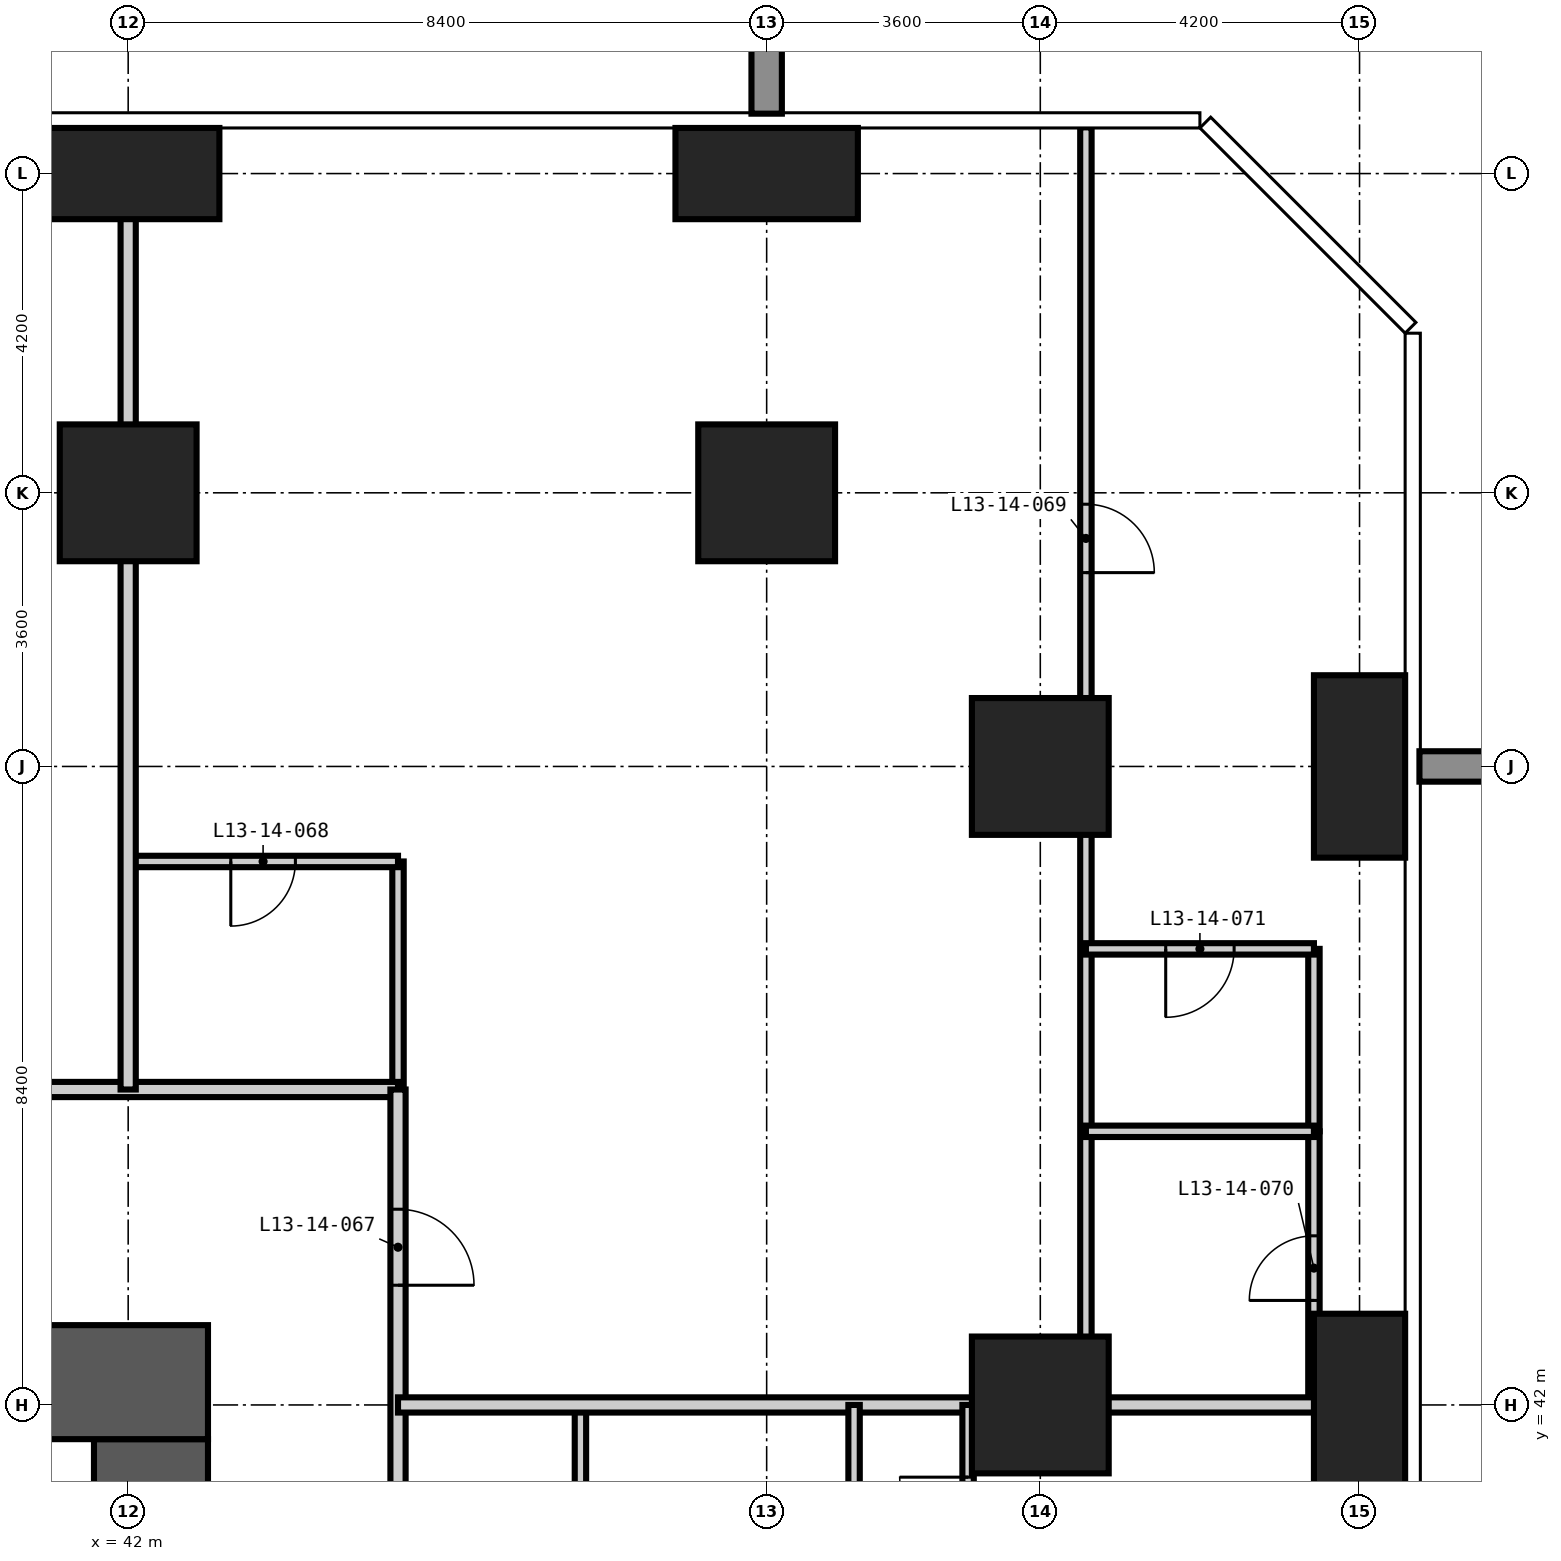
"""IFC4 building model, lengths in metres.
Left out: names, types, materials, properties, quantities, classifications, styles, units other than length and angle.
Written with IfcOpenShell. Run it as: python <this file> out.ifc"""

import sys

from ifc_helpers import new_model, si_unit, direction, frame, frame_2d, origin, origin_2d, place, context, subcontext, project, spatial, rectangle, extrude, element, fill, save


model = new_model("IFC4")
c1 = context("Model", 3, precision=1e-05, world=origin(), true_north=direction((0.0, 1.0)))
c2 = subcontext(c1, "Body", "Model", "MODEL_VIEW")
j1 = project(units=[si_unit("LENGTHUNIT", "METRE"), si_unit("PLANEANGLEUNIT", "RADIAN")], contexts=[c1])
p1 = place(None, origin())
s1 = spatial("IfcSite", under=j1, at=p1, CompositionType="ELEMENT")
p2 = place(p1, origin())
s2 = spatial("IfcBuilding", under=s1, at=p2, CompositionType="ELEMENT")
p3 = place(p2, frame((0.0, 0.0, 55.8)))
s3 = spatial("IfcBuildingStorey", under=s2, at=p3, CompositionType="ELEMENT", Elevation=55.8)
p4 = place(p3, frame((42.0, 54.0, -0.35), z_axis=(0.0, 0.0, 1.0), x_axis=(1.0, 0.0, 0.0)))
e1 = element("IfcColumn", 1, at=p4, inside=s3, PredefinedType="COLUMN", context=c2, shape_type="SweptSolid", body=[
    extrude(rectangle(XDim=1.8, YDim=1.8, at=origin_2d()), origin(), (0.0, 0.0, 1.0), 3.6),
])
p5 = place(p3, frame((42.0, 58.2, -0.35), z_axis=(0.0, 0.0, 1.0), x_axis=(1.0, 0.0, 0.0)))
e2 = element("IfcColumn", 2, at=p5, inside=s3, PredefinedType="COLUMN", context=c2, shape_type="SweptSolid", body=[
    extrude(rectangle(XDim=2.4, YDim=1.2, at=origin_2d()), origin(), (0.0, 0.0, 1.0), 3.6),
])
p6 = place(p3, frame((50.4, 54.0, -0.35), z_axis=(0.0, 0.0, 1.0), x_axis=(1.0, 0.0, 0.0)))
e3 = element("IfcColumn", 3, at=p6, inside=s3, PredefinedType="COLUMN", context=c2, shape_type="SweptSolid", body=[
    extrude(rectangle(XDim=1.8, YDim=1.8, at=origin_2d()), origin(), (0.0, 0.0, 1.0), 3.6),
])
p7 = place(p3, frame((50.4, 58.2, -0.35), z_axis=(0.0, 0.0, 1.0), x_axis=(1.0, 0.0, 0.0)))
e4 = element("IfcColumn", 4, at=p7, inside=s3, PredefinedType="COLUMN", context=c2, shape_type="SweptSolid", body=[
    extrude(rectangle(XDim=2.4, YDim=1.2, at=origin_2d()), origin(), (0.0, 0.0, 1.0), 3.6),
])
for number, where, z_axis, x_axis in (
    (5, (54.0, 42.0, -0.35), (0.0, 0.0, 1.0), (1.0, 0.0, 0.0)),
    (6, (54.0, 50.4, -0.35), (0.0, 0.0, 1.0), (1.0, 0.0, 0.0)),
):
    element("IfcColumn", number, at=place(p3, frame(where, z_axis=z_axis, x_axis=x_axis)), inside=s3, PredefinedType="COLUMN", context=c2, shape_type="SweptSolid", body=[
        extrude(rectangle(XDim=1.8, YDim=1.8, at=origin_2d()), origin(), (0.0, 0.0, 1.0), 3.6),
    ])
for number, where, z_axis, x_axis in (
    (7, (58.2, 42.0, -0.35), (0.0, 0.0, 1.0), (1.0, 0.0, 0.0)),
    (8, (58.2, 50.4, -0.35), (0.0, 0.0, 1.0), (1.0, 0.0, 0.0)),
):
    element("IfcColumn", number, at=place(p3, frame(where, z_axis=z_axis, x_axis=x_axis)), inside=s3, PredefinedType="COLUMN", context=c2, shape_type="SweptSolid", body=[
        extrude(rectangle(XDim=1.2, YDim=2.4, at=origin_2d()), origin(), (0.0, 0.0, 1.0), 3.6),
    ])
p8 = place(p3, frame((42.3, 17.25, -0.35), z_axis=(0.0, 0.0, 1.0), x_axis=(0.0, 1.0, 0.0)))
e9 = element("IfcWall", 9, at=p8, inside=s3, PredefinedType="SHEAR", context=c2, shape_type="SweptSolid", body=[
    extrude(rectangle(XDim=24.3, YDim=1.5, at=frame_2d((12.15, 0.0))), origin(), (0.0, 0.0, 1.0), 3.6),
])
p9 = place(p8, frame((0.35, 0.0, 0.35)))
e10 = element("IfcOpeningElement", 10, at=p9, cuts=e9, PredefinedType="OPENING", context=c2, shape_type="SweptSolid", body=[
    extrude(rectangle(XDim=1.2, YDim=2.2, at=frame_2d((0.6, 1.1))), frame((0.0, 0.76, 0.0), z_axis=(0.0, -1.0, 0.0), x_axis=(1.0, 0.0, 0.0)), (0.0, 0.0, 1.0), 1.52),
])
p10 = place(p8, frame((11.65, 0.0, 0.35)))
e11 = element("IfcOpeningElement", 11, at=p10, cuts=e9, PredefinedType="OPENING", context=c2, shape_type="SweptSolid", body=[
    extrude(rectangle(XDim=1.0, YDim=2.1, at=frame_2d((0.5, 1.05))), frame((0.0, 0.76, 0.0), z_axis=(0.0, -1.0, 0.0), x_axis=(1.0, 0.0, 0.0)), (0.0, 0.0, 1.0), 1.52),
])
p11 = place(p8, frame((20.05, 0.0, 0.35)))
e12 = element("IfcOpeningElement", 12, at=p11, cuts=e9, PredefinedType="OPENING", context=c2, shape_type="SweptSolid", body=[
    extrude(rectangle(XDim=1.0, YDim=2.1, at=frame_2d((0.5, 1.05))), frame((0.0, 0.76, 0.0), z_axis=(0.0, -1.0, 0.0), x_axis=(1.0, 0.0, 0.0)), (0.0, 0.0, 1.0), 1.52),
])
p12 = place(p3, frame((43.05, 42.3, -0.35), z_axis=(0.0, 0.0, 1.0), x_axis=(-1.0, 0.0, 0.0)))
e13 = element("IfcWall", 13, at=p12, inside=s3, PredefinedType="SHEAR", context=c2, shape_type="SweptSolid", body=[
    extrude(rectangle(XDim=27.3, YDim=1.5, at=frame_2d((13.65, 0.0))), origin(), (0.0, 0.0, 1.0), 3.6),
])
p13 = place(p12, frame((21.55, 0.0, 0.35)))
e14 = element("IfcOpeningElement", 14, at=p13, cuts=e13, PredefinedType="OPENING", context=c2, shape_type="SweptSolid", body=[
    extrude(rectangle(XDim=1.0, YDim=2.1, at=frame_2d((0.5, 1.05))), frame((0.0, 0.76, 0.0), z_axis=(0.0, -1.0, 0.0), x_axis=(1.0, 0.0, 0.0)), (0.0, 0.0, 1.0), 1.52),
])
p14 = place(p12, frame((10.95, 0.0, 0.35)))
e15 = element("IfcOpeningElement", 15, at=p14, cuts=e13, PredefinedType="OPENING", context=c2, shape_type="SweptSolid", body=[
    extrude(rectangle(XDim=1.2, YDim=2.2, at=frame_2d((0.6, 1.1))), frame((0.0, 0.76, 0.0), z_axis=(0.0, -1.0, 0.0), x_axis=(1.0, 0.0, 0.0)), (0.0, 0.0, 1.0), 1.52),
])
p15 = place(p3, frame((45.55, 46.15, 0.0), z_axis=(0.0, 0.0, 1.0), x_axis=(0.0, 1.0, 0.0)))
e16 = element("IfcWall", 16, at=p15, inside=s3, PredefinedType="PARTITIONING", context=c2, shape_type="SweptSolid", body=[
    extrude(rectangle(XDim=3.0, YDim=0.15, at=frame_2d((1.5, 0.0))), origin(), (0.0, 0.0, 1.0), 3.25),
])
p16 = place(p3, frame((47.95, 39.6, 0.0), z_axis=(0.0, 0.0, 1.0), x_axis=(0.0, 1.0, 0.0)))
e17 = element("IfcWall", 17, at=p16, inside=s3, PredefinedType="PARTITIONING", context=c2, shape_type="SweptSolid", body=[
    extrude(rectangle(XDim=2.4, YDim=0.15, at=frame_2d((1.2, 0.0))), origin(), (0.0, 0.0, 1.0), 3.25),
])
p17 = place(p3, frame((57.6, 42.0, 0.0), z_axis=(0.0, 0.0, 1.0), x_axis=(0.0, 1.0, 0.0)))
e18 = element("IfcWall", 18, at=p17, inside=s3, PredefinedType="PARTITIONING", context=c2, shape_type="SweptSolid", body=[
    extrude(rectangle(XDim=3.6, YDim=0.15, at=frame_2d((1.8, 0.0))), origin(), (0.0, 0.0, 1.0), 3.25),
])
p18 = place(p17, frame((1.375, 0.0, 0.0)))
e19 = element("IfcOpeningElement", 19, at=p18, cuts=e18, PredefinedType="OPENING", context=c2, shape_type="SweptSolid", body=[
    extrude(rectangle(XDim=0.85, YDim=2.1, at=frame_2d((0.425, 1.05))), frame((0.0, 0.085, 0.0), z_axis=(0.0, -1.0, 0.0), x_axis=(1.0, 0.0, 0.0)), (0.0, 0.0, 1.0), 0.17),
])
p19 = place(p3, frame((42.0, 49.15, 0.0), z_axis=(0.0, 0.0, 1.0), x_axis=(1.0, 0.0, 0.0)))
e20 = element("IfcWall", 20, at=p19, inside=s3, PredefinedType="PARTITIONING", context=c2, shape_type="SweptSolid", body=[
    extrude(rectangle(XDim=3.55, YDim=0.15, at=frame_2d((1.775, 0.0))), origin(), (0.0, 0.0, 1.0), 3.25),
])
p20 = place(p19, frame((1.35, 0.0, 0.0)))
e21 = element("IfcOpeningElement", 21, at=p20, cuts=e20, PredefinedType="OPENING", context=c2, shape_type="SweptSolid", body=[
    extrude(rectangle(XDim=0.85, YDim=2.1, at=frame_2d((0.425, 1.05))), frame((0.0, 0.085, 0.0), z_axis=(0.0, -1.0, 0.0), x_axis=(1.0, 0.0, 0.0)), (0.0, 0.0, 1.0), 0.17),
])
p21 = place(p3, frame((13.85, 46.15, 0.0), z_axis=(0.0, 0.0, 1.0), x_axis=(1.0, 0.0, 0.0)))
e22 = element("IfcWall", 22, at=p21, inside=s3, PredefinedType="PARTITIONING", context=c2, shape_type="SweptSolid", body=[
    extrude(rectangle(XDim=31.7, YDim=0.2, at=frame_2d((15.85, 0.0))), origin(), (0.0, 0.0, 1.0), 3.25),
])
p22 = place(p21, frame((6.65, 0.0, 0.0)))
e23 = element("IfcOpeningElement", 23, at=p22, cuts=e22, PredefinedType="OPENING", context=c2, shape_type="SweptSolid", body=[
    extrude(rectangle(XDim=1.0, YDim=2.2, at=frame_2d((0.5, 1.1))), frame((0.0, 0.11, 0.0), z_axis=(0.0, -1.0, 0.0), x_axis=(1.0, 0.0, 0.0)), (0.0, 0.0, 1.0), 0.22),
])
p23 = place(p21, frame((15.05, 0.0, 0.0)))
e24 = element("IfcOpeningElement", 24, at=p23, cuts=e22, PredefinedType="OPENING", context=c2, shape_type="SweptSolid", body=[
    extrude(rectangle(XDim=1.0, YDim=2.2, at=frame_2d((0.5, 1.1))), frame((0.0, 0.11, 0.0), z_axis=(0.0, -1.0, 0.0), x_axis=(1.0, 0.0, 0.0)), (0.0, 0.0, 1.0), 0.22),
])
p24 = place(p21, frame((23.45, 0.0, 0.0)))
e25 = element("IfcOpeningElement", 25, at=p24, cuts=e22, PredefinedType="OPENING", context=c2, shape_type="SweptSolid", body=[
    extrude(rectangle(XDim=1.0, YDim=2.2, at=frame_2d((0.5, 1.1))), frame((0.0, 0.11, 0.0), z_axis=(0.0, -1.0, 0.0), x_axis=(1.0, 0.0, 0.0)), (0.0, 0.0, 1.0), 0.22),
])
p25 = place(p3, frame((45.55, 46.15, 0.0), z_axis=(0.0, 0.0, 1.0), x_axis=(0.0, -1.0, 0.0)))
e26 = element("IfcWall", 26, at=p25, inside=s3, PredefinedType="PARTITIONING", context=c2, shape_type="SweptSolid", body=[
    extrude(rectangle(XDim=32.3, YDim=0.2, at=frame_2d((16.15, 0.0))), origin(), (0.0, 0.0, 1.0), 3.25),
])
p26 = place(p25, frame((25.85, 0.0, 0.0)))
e27 = element("IfcOpeningElement", 27, at=p26, cuts=e26, PredefinedType="OPENING", context=c2, shape_type="SweptSolid", body=[
    extrude(rectangle(XDim=1.0, YDim=2.2, at=frame_2d((0.5, 1.1))), frame((0.0, 0.11, 0.0), z_axis=(0.0, -1.0, 0.0), x_axis=(1.0, 0.0, 0.0)), (0.0, 0.0, 1.0), 0.22),
])
p27 = place(p25, frame((17.45, 0.0, 0.0)))
e28 = element("IfcOpeningElement", 28, at=p27, cuts=e26, PredefinedType="OPENING", context=c2, shape_type="SweptSolid", body=[
    extrude(rectangle(XDim=1.0, YDim=2.2, at=frame_2d((0.5, 1.1))), frame((0.0, 0.11, 0.0), z_axis=(0.0, -1.0, 0.0), x_axis=(1.0, 0.0, 0.0)), (0.0, 0.0, 1.0), 0.22),
])
p28 = place(p25, frame((9.05, 0.0, 0.0)))
e29 = element("IfcOpeningElement", 29, at=p28, cuts=e26, PredefinedType="OPENING", context=c2, shape_type="SweptSolid", body=[
    extrude(rectangle(XDim=1.0, YDim=2.2, at=frame_2d((0.5, 1.1))), frame((0.0, 0.11, 0.0), z_axis=(0.0, -1.0, 0.0), x_axis=(1.0, 0.0, 0.0)), (0.0, 0.0, 1.0), 0.22),
])
p29 = place(p25, frame((30.325, 0.0, 0.0)))
e30 = element("IfcOpeningElement", 30, at=p29, cuts=e26, PredefinedType="OPENING", context=c2, shape_type="SweptSolid", body=[
    extrude(rectangle(XDim=1.0, YDim=2.2, at=frame_2d((0.5, 1.1))), frame((0.0, 0.11, 0.0), z_axis=(0.0, -1.0, 0.0), x_axis=(1.0, 0.0, 0.0)), (0.0, 0.0, 1.0), 0.22),
])
p30 = place(p25, frame((1.575, 0.0, 0.0)))
e31 = element("IfcOpeningElement", 31, at=p30, cuts=e26, PredefinedType="OPENING", context=c2, shape_type="SweptSolid", body=[
    extrude(rectangle(XDim=1.0, YDim=2.2, at=frame_2d((0.5, 1.1))), frame((0.0, 0.11, 0.0), z_axis=(0.0, -1.0, 0.0), x_axis=(1.0, 0.0, 0.0)), (0.0, 0.0, 1.0), 0.22),
])
p31 = place(p3, frame((42.0, 46.15, 0.0), z_axis=(0.0, 0.0, 1.0), x_axis=(0.0, 1.0, 0.0)))
e32 = element("IfcWall", 32, at=p31, inside=s3, PredefinedType="PARTITIONING", context=c2, shape_type="SweptSolid", body=[
    extrude(rectangle(XDim=12.658, YDim=0.2, at=frame_2d((6.329, 0.0))), origin(), (0.0, 0.0, 1.0), 3.25),
])
p32 = place(p3, frame((45.55, 42.0, 0.0), z_axis=(0.0, 0.0, 1.0), x_axis=(1.0, 0.0, 0.0)))
e33 = element("IfcWall", 33, at=p32, inside=s3, PredefinedType="PARTITIONING", context=c2, shape_type="SweptSolid", body=[
    extrude(rectangle(XDim=13.258, YDim=0.2, at=frame_2d((6.629, 0.0))), origin(), (0.0, 0.0, 1.0), 3.25),
])
p33 = place(p3, frame((51.55, 39.6, 0.0), z_axis=(0.0, 0.0, 1.0), x_axis=(0.0, 1.0, 0.0)))
e34 = element("IfcWall", 34, at=p33, inside=s3, PredefinedType="PARTITIONING", context=c2, shape_type="SweptSolid", body=[
    extrude(rectangle(XDim=2.4, YDim=0.15, at=frame_2d((1.2, 0.0))), origin(), (0.0, 0.0, 1.0), 3.25),
])
p34 = place(p3, frame((53.05, 39.6, 0.0), z_axis=(0.0, 0.0, 1.0), x_axis=(0.0, 1.0, 0.0)))
e35 = element("IfcWall", 35, at=p34, inside=s3, PredefinedType="PARTITIONING", context=c2, shape_type="SweptSolid", body=[
    extrude(rectangle(XDim=2.4, YDim=0.15, at=frame_2d((1.2, 0.0))), origin(), (0.0, 0.0, 1.0), 3.25),
])
p35 = place(p34, frame((0.55, 0.0, 0.0)))
e36 = element("IfcOpeningElement", 36, at=p35, cuts=e35, PredefinedType="OPENING", context=c2, shape_type="SweptSolid", body=[
    extrude(rectangle(XDim=0.9, YDim=2.1, at=frame_2d((0.45, 1.05))), frame((0.0, 0.085, 0.0), z_axis=(0.0, -1.0, 0.0), x_axis=(1.0, 0.0, 0.0)), (0.0, 0.0, 1.0), 0.17),
])
p36 = place(p3, frame((54.6, 42.0, 0.0), z_axis=(0.0, 0.0, 1.0), x_axis=(0.0, 1.0, 0.0)))
e37 = element("IfcWall", 37, at=p36, inside=s3, PredefinedType="PARTITIONING", context=c2, shape_type="SweptSolid", body=[
    extrude(rectangle(XDim=16.808, YDim=0.15, at=frame_2d((8.404, 0.0))), origin(), (0.0, 0.0, 1.0), 3.25),
])
p37 = place(p36, frame((10.95, 0.0, 0.0)))
e38 = element("IfcOpeningElement", 38, at=p37, cuts=e37, PredefinedType="OPENING", context=c2, shape_type="SweptSolid", body=[
    extrude(rectangle(XDim=0.9, YDim=2.1, at=frame_2d((0.45, 1.05))), frame((0.0, 0.085, 0.0), z_axis=(0.0, -1.0, 0.0), x_axis=(1.0, 0.0, 0.0)), (0.0, 0.0, 1.0), 0.17),
])
p38 = place(p3, frame((57.6, 45.6, 0.0), z_axis=(0.0, 0.0, 1.0), x_axis=(0.0, 1.0, 0.0)))
e39 = element("IfcWall", 39, at=p38, inside=s3, PredefinedType="PARTITIONING", context=c2, shape_type="SweptSolid", body=[
    extrude(rectangle(XDim=2.4, YDim=0.15, at=frame_2d((1.2, 0.0))), origin(), (0.0, 0.0, 1.0), 3.25),
])
p39 = place(p3, frame((54.6, 45.6, 0.0), z_axis=(0.0, 0.0, 1.0), x_axis=(1.0, 0.0, 0.0)))
e40 = element("IfcWall", 40, at=p39, inside=s3, PredefinedType="PARTITIONING", context=c2, shape_type="SweptSolid", body=[
    extrude(rectangle(XDim=3.0, YDim=0.15, at=frame_2d((1.5, 0.0))), origin(), (0.0, 0.0, 1.0), 3.25),
])
p40 = place(p3, frame((54.6, 48.0, 0.0), z_axis=(0.0, 0.0, 1.0), x_axis=(1.0, 0.0, 0.0)))
e41 = element("IfcWall", 41, at=p40, inside=s3, PredefinedType="PARTITIONING", context=c2, shape_type="SweptSolid", body=[
    extrude(rectangle(XDim=3.0, YDim=0.15, at=frame_2d((1.5, 0.0))), origin(), (0.0, 0.0, 1.0), 3.25),
])
p41 = place(p40, frame((1.05, 0.0, 0.0)))
e42 = element("IfcOpeningElement", 42, at=p41, cuts=e41, PredefinedType="OPENING", context=c2, shape_type="SweptSolid", body=[
    extrude(rectangle(XDim=0.9, YDim=2.1, at=frame_2d((0.45, 1.05))), frame((0.0, 0.085, 0.0), z_axis=(0.0, -1.0, 0.0), x_axis=(1.0, 0.0, 0.0)), (0.0, 0.0, 1.0), 0.17),
])
p42 = place(p35, origin())
e43 = element("IfcDoor", 43, at=p42, inside=s3, OperationType="SINGLE_SWING_RIGHT", PredefinedType="DOOR", context=c2, shape_type="SweptSolid", body=[
    extrude(rectangle(XDim=0.9, YDim=2.1, at=frame_2d((0.45, 1.05))), frame((0.0, 0.025, 0.0), z_axis=(0.0, -1.0, 0.0), x_axis=(1.0, 0.0, 0.0)), (0.0, 0.0, 1.0), 0.05),
])
fill(e36, e43)
p43 = place(p30, origin())
e44 = element("IfcDoor", 44, at=p43, inside=s3, OperationType="SINGLE_SWING_RIGHT", PredefinedType="DOOR", context=c2, shape_type="SweptSolid", body=[
    extrude(rectangle(XDim=1.0, YDim=2.2, at=frame_2d((0.5, 1.1))), frame((0.0, 0.025, 0.0), z_axis=(0.0, -1.0, 0.0), x_axis=(1.0, 0.0, 0.0)), (0.0, 0.0, 1.0), 0.05),
])
fill(e31, e44)
p44 = place(p20, frame((0.85, 0.0, 0.0), z_axis=(0.0, 0.0, 1.0), x_axis=(-1.0, 0.0, 0.0)))
e45 = element("IfcDoor", 45, at=p44, inside=s3, OperationType="SINGLE_SWING_RIGHT", PredefinedType="DOOR", context=c2, shape_type="SweptSolid", body=[
    extrude(rectangle(XDim=0.85, YDim=2.1, at=frame_2d((0.425, 1.05))), frame((0.0, 0.025, 0.0), z_axis=(0.0, -1.0, 0.0), x_axis=(1.0, 0.0, 0.0)), (0.0, 0.0, 1.0), 0.05),
])
fill(e21, e45)
p45 = place(p37, frame((0.9, 0.0, 0.0), z_axis=(0.0, 0.0, 1.0), x_axis=(-1.0, 0.0, 0.0)))
e46 = element("IfcDoor", 46, at=p45, inside=s3, OperationType="SINGLE_SWING_RIGHT", PredefinedType="DOOR", context=c2, shape_type="SweptSolid", body=[
    extrude(rectangle(XDim=0.9, YDim=2.1, at=frame_2d((0.45, 1.05))), frame((0.0, 0.025, 0.0), z_axis=(0.0, -1.0, 0.0), x_axis=(1.0, 0.0, 0.0)), (0.0, 0.0, 1.0), 0.05),
])
fill(e38, e46)
p46 = place(p18, origin())
e47 = element("IfcDoor", 47, at=p46, inside=s3, OperationType="SINGLE_SWING_LEFT", PredefinedType="DOOR", context=c2, shape_type="SweptSolid", body=[
    extrude(rectangle(XDim=0.85, YDim=2.1, at=frame_2d((0.425, 1.05))), frame((0.0, 0.025, 0.0), z_axis=(0.0, -1.0, 0.0), x_axis=(1.0, 0.0, 0.0)), (0.0, 0.0, 1.0), 0.05),
])
fill(e19, e47)
p47 = place(p41, frame((0.9, 0.0, 0.0), z_axis=(0.0, 0.0, 1.0), x_axis=(-1.0, 0.0, 0.0)))
e48 = element("IfcDoor", 48, at=p47, inside=s3, OperationType="SINGLE_SWING_RIGHT", PredefinedType="DOOR", context=c2, shape_type="SweptSolid", body=[
    extrude(rectangle(XDim=0.9, YDim=2.1, at=frame_2d((0.45, 1.05))), frame((0.0, 0.025, 0.0), z_axis=(0.0, -1.0, 0.0), x_axis=(1.0, 0.0, 0.0)), (0.0, 0.0, 1.0), 0.05),
])
fill(e42, e48)
save(model, sys.argv[1])
